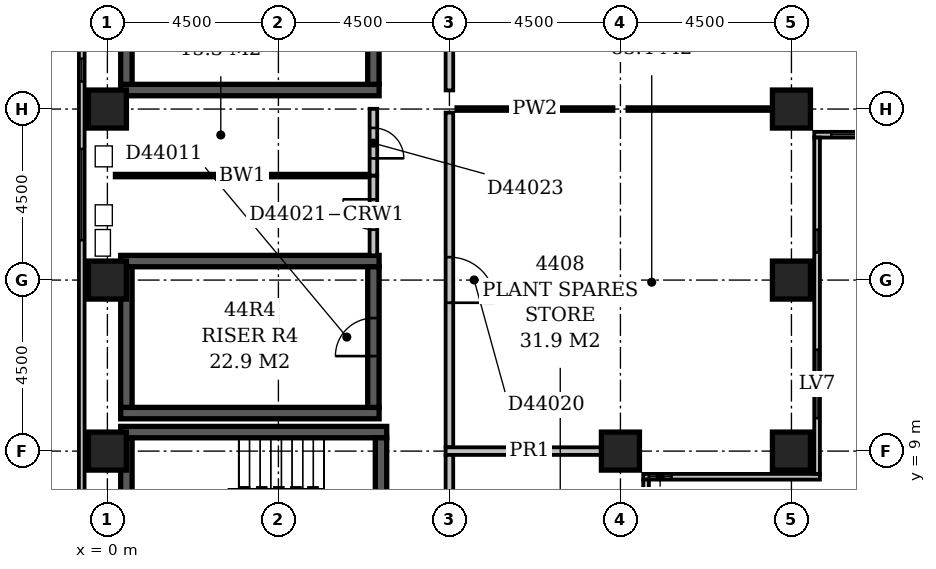
"""IFC4 building model, lengths in metres.
Left out: names, types, materials, properties, quantities, classifications, styles, units other than length and angle.
Written with IfcOpenShell. Run it as: python <this file> out.ifc"""

import sys

from ifc_helpers import new_model, si_unit, direction, frame, frame_2d, origin, origin_2d, place, context, subcontext, project, spatial, rectangle, extrude, element, fill, save


model = new_model("IFC4")
c1 = context("Model", 3, precision=1e-05, world=origin(), true_north=direction((0.0, 1.0)))
c2 = subcontext(c1, "Body", "Model", "MODEL_VIEW")
j1 = project(units=[si_unit("LENGTHUNIT", "METRE"), si_unit("PLANEANGLEUNIT", "RADIAN")], contexts=[c1])
p1 = place(None, origin())
s1 = spatial("IfcSite", under=j1, at=p1, CompositionType="ELEMENT")
p2 = place(p1, origin())
s2 = spatial("IfcBuilding", under=s1, at=p2, CompositionType="ELEMENT")
p3 = place(p2, frame((0.0, 0.0, 173.6)))
s3 = spatial("IfcBuildingStorey", under=s2, at=p3, CompositionType="ELEMENT", Elevation=173.6)
p4 = place(p3, frame((0.35, 9.5, -0.45), z_axis=(0.0, 0.0, 1.0), x_axis=(1.0, 0.0, 0.0)))
e1 = element("IfcWall", 1, at=p4, inside=s3, PredefinedType="SHEAR", context=c2, shape_type="SweptSolid", body=[
    extrude(rectangle(XDim=7.0, YDim=0.3, at=frame_2d((3.5, 0.0))), origin(), (0.0, 0.0, 1.0), 5.55),
])
for number, where, z_axis, x_axis in (
    (2, (0.35, 10.0, -0.45), (0.0, 0.0, 1.0), (1.0, 0.0, 0.0)),
    (3, (0.35, 14.0, -0.45), (0.0, 0.0, 1.0), (1.0, 0.0, 0.0)),
    (4, (0.35, 18.5, -0.45), (0.0, 0.0, 1.0), (1.0, 0.0, 0.0)),
):
    element("IfcWall", number, at=place(p3, frame(where, z_axis=z_axis, x_axis=x_axis)), inside=s3, PredefinedType="SHEAR", context=c2, shape_type="SweptSolid", body=[
        extrude(rectangle(XDim=6.8, YDim=0.3, at=frame_2d((3.4, 0.0))), origin(), (0.0, 0.0, 1.0), 5.55),
    ])
p5 = place(p3, frame((0.5, 5.15, -0.45), z_axis=(0.0, 0.0, 1.0), x_axis=(0.0, 1.0, 0.0)))
e5 = element("IfcWall", 5, at=p5, inside=s3, PredefinedType="SHEAR", context=c2, shape_type="SweptSolid", body=[
    extrude(rectangle(XDim=4.2, YDim=0.3, at=frame_2d((2.1, 0.0))), origin(), (0.0, 0.0, 1.0), 5.55),
])
for number, where, z_axis, x_axis in (
    (6, (0.5, 10.15, -0.45), (0.0, 0.0, 1.0), (0.0, 1.0, 0.0)),
    (7, (0.5, 18.65, -0.45), (0.0, 0.0, 1.0), (0.0, 1.0, 0.0)),
):
    element("IfcWall", number, at=place(p3, frame(where, z_axis=z_axis, x_axis=x_axis)), inside=s3, PredefinedType="SHEAR", context=c2, shape_type="SweptSolid", body=[
        extrude(rectangle(XDim=3.7, YDim=0.3, at=frame_2d((1.85, 0.0))), origin(), (0.0, 0.0, 1.0), 5.55),
    ])
p6 = place(p3, frame((7.0, 10.15, -0.45), z_axis=(0.0, 0.0, 1.0), x_axis=(0.0, 1.0, 0.0)))
e8 = element("IfcWall", 8, at=p6, inside=s3, PredefinedType="SHEAR", context=c2, shape_type="SweptSolid", body=[
    extrude(rectangle(XDim=3.7, YDim=0.3, at=frame_2d((1.85, 0.0))), origin(), (0.0, 0.0, 1.0), 5.55),
])
p7 = place(p6, frame((1.35, 0.0, 0.45)))
e9 = element("IfcOpeningElement", 9, at=p7, cuts=e8, PredefinedType="OPENING", context=c2, shape_type="SweptSolid", body=[
    extrude(rectangle(XDim=1.0, YDim=2.1, at=frame_2d((0.5, 1.05))), frame((0.0, 0.162, 0.0), z_axis=(0.0, -1.0, 0.0), x_axis=(1.0, 0.0, 0.0)), (0.0, 0.0, 1.0), 0.324),
])
p8 = place(p3, frame((7.0, 18.65, -0.45), z_axis=(0.0, 0.0, 1.0), x_axis=(0.0, 1.0, 0.0)))
e10 = element("IfcWall", 10, at=p8, inside=s3, PredefinedType="SHEAR", context=c2, shape_type="SweptSolid", body=[
    extrude(rectangle(XDim=3.7, YDim=0.3, at=frame_2d((1.85, 0.0))), origin(), (0.0, 0.0, 1.0), 5.55),
])
p9 = place(p8, frame((1.35, 0.0, 0.45)))
e11 = element("IfcOpeningElement", 11, at=p9, cuts=e10, PredefinedType="OPENING", context=c2, shape_type="SweptSolid", body=[
    extrude(rectangle(XDim=1.0, YDim=2.1, at=frame_2d((0.5, 1.05))), frame((0.0, 0.162, 0.0), z_axis=(0.0, -1.0, 0.0), x_axis=(1.0, 0.0, 0.0)), (0.0, 0.0, 1.0), 0.324),
])
p10 = place(p3, frame((7.2, 5.15, -0.45), z_axis=(0.0, 0.0, 1.0), x_axis=(0.0, 1.0, 0.0)))
e12 = element("IfcWall", 12, at=p10, inside=s3, PredefinedType="SHEAR", context=c2, shape_type="SweptSolid", body=[
    extrude(rectangle(XDim=4.2, YDim=0.3, at=frame_2d((2.1, 0.0))), origin(), (0.0, 0.0, 1.0), 5.55),
])
p11 = place(p10, frame((1.55, 0.0, 0.45)))
e13 = element("IfcOpeningElement", 13, at=p11, cuts=e12, PredefinedType="OPENING", context=c2, shape_type="SweptSolid", body=[
    extrude(rectangle(XDim=1.1, YDim=2.1, at=frame_2d((0.55, 1.05))), frame((0.0, 0.162, 0.0), z_axis=(0.0, -1.0, 0.0), x_axis=(1.0, 0.0, 0.0)), (0.0, 0.0, 1.0), 0.324),
])
for number, where, z_axis, x_axis in (
    (14, (0.0, 9.0, -0.45), (0.0, 0.0, 1.0), (1.0, 0.0, 0.0)),
    (15, (13.5, 9.0, -0.45), (0.0, 0.0, 1.0), (1.0, 0.0, 0.0)),
    (16, (18.0, 9.0, -0.45), (0.0, 0.0, 1.0), (1.0, 0.0, 0.0)),
    (17, (0.0, 13.5, -0.45), (0.0, 0.0, 1.0), (1.0, 0.0, 0.0)),
    (18, (18.0, 13.5, -0.45), (0.0, 0.0, 1.0), (1.0, 0.0, 0.0)),
    (19, (0.0, 18.0, -0.45), (0.0, 0.0, 1.0), (1.0, 0.0, 0.0)),
    (20, (18.0, 18.0, -0.45), (0.0, 0.0, 1.0), (1.0, 0.0, 0.0)),
):
    element("IfcColumn", number, at=place(p3, frame(where, z_axis=z_axis, x_axis=x_axis)), inside=s3, PredefinedType="COLUMN", context=c2, shape_type="SweptSolid", body=[
        extrude(rectangle(XDim=1.0, YDim=1.0, at=origin_2d()), origin(), (0.0, 0.0, 1.0), 5.55),
    ])
p12 = place(p3, frame((14.175, 3.9, 0.0), z_axis=(0.0, 0.0, 1.0), x_axis=(0.0, 1.0, 0.0)))
e21 = element("IfcWall", 21, at=p12, inside=s3, PredefinedType="STANDARD", context=c2, shape_type="SweptSolid", body=[
    extrude(rectangle(XDim=4.35, YDim=0.15, at=frame_2d((2.175, 0.0))), origin(), (0.0, 0.0, 1.0), 4.5),
])
p13 = place(p12, frame((1.65, 0.0, 0.6)))
e22 = element("IfcOpeningElement", 22, at=p13, cuts=e21, PredefinedType="OPENING", context=c2, shape_type="SweptSolid", body=[
    extrude(rectangle(XDim=2.4, YDim=2.4, at=frame_2d((1.2, 1.2))), frame((0.0, 0.087, 0.0), z_axis=(0.0, -1.0, 0.0), x_axis=(1.0, 0.0, 0.0)), (0.0, 0.0, 1.0), 0.174),
])
p14 = place(p3, frame((14.1, 8.325, 0.0), z_axis=(0.0, 0.0, 1.0), x_axis=(1.0, 0.0, 0.0)))
e23 = element("IfcWall", 23, at=p14, inside=s3, PredefinedType="STANDARD", context=c2, shape_type="SweptSolid", body=[
    extrude(rectangle(XDim=4.65, YDim=0.15, at=frame_2d((2.325, 0.0))), origin(), (0.0, 0.0, 1.0), 4.5),
])
p15 = place(p14, frame((0.145, 0.0, 0.6)))
e24 = element("IfcOpeningElement", 24, at=p15, cuts=e23, PredefinedType="OPENING", context=c2, shape_type="SweptSolid", body=[
    extrude(rectangle(XDim=0.6, YDim=2.4, at=frame_2d((0.3, 1.2))), frame((0.0, 0.087, 0.0), z_axis=(0.0, -1.0, 0.0), x_axis=(1.0, 0.0, 0.0)), (0.0, 0.0, 1.0), 0.174),
])
p16 = place(p3, frame((18.675, 8.4, 0.0), z_axis=(0.0, 0.0, 1.0), x_axis=(0.0, 1.0, 0.0)))
e25 = element("IfcWall", 25, at=p16, inside=s3, PredefinedType="STANDARD", context=c2, shape_type="SweptSolid", body=[
    extrude(rectangle(XDim=8.85, YDim=0.15, at=frame_2d((4.425, 0.0))), origin(), (0.0, 0.0, 1.0), 4.5),
])
p17 = place(p16, frame((1.467, 0.0, 0.6)))
e26 = element("IfcOpeningElement", 26, at=p17, cuts=e25, PredefinedType="OPENING", context=c2, shape_type="SweptSolid", body=[
    extrude(rectangle(XDim=1.8, YDim=2.4, at=frame_2d((0.9, 1.2))), frame((0.0, 0.087, 0.0), z_axis=(0.0, -1.0, 0.0), x_axis=(1.0, 0.0, 0.0)), (0.0, 0.0, 1.0), 0.174),
])
p18 = place(p16, frame((5.825, 0.0, 0.6)))
e27 = element("IfcOpeningElement", 27, at=p18, cuts=e25, PredefinedType="OPENING", context=c2, shape_type="SweptSolid", body=[
    extrude(rectangle(XDim=0.6, YDim=2.4, at=frame_2d((0.3, 1.2))), frame((0.0, 0.087, 0.0), z_axis=(0.0, -1.0, 0.0), x_axis=(1.0, 0.0, 0.0)), (0.0, 0.0, 1.0), 0.174),
])
p19 = place(p3, frame((18.6, 17.325, 0.0), z_axis=(0.0, 0.0, 1.0), x_axis=(1.0, 0.0, 0.0)))
e28 = element("IfcWall", 28, at=p19, inside=s3, PredefinedType="STANDARD", context=c2, shape_type="SweptSolid", body=[
    extrude(rectangle(XDim=4.65, YDim=0.15, at=frame_2d((2.325, 0.0))), origin(), (0.0, 0.0, 1.0), 4.5),
])
p20 = place(p19, frame((0.45, 0.0, 0.6)))
e29 = element("IfcOpeningElement", 29, at=p20, cuts=e28, PredefinedType="OPENING", context=c2, shape_type="SweptSolid", body=[
    extrude(rectangle(XDim=2.4, YDim=2.4, at=frame_2d((1.2, 1.2))), frame((0.0, 0.087, 0.0), z_axis=(0.0, -1.0, 0.0), x_axis=(1.0, 0.0, 0.0)), (0.0, 0.0, 1.0), 0.174),
])
p21 = place(p3, frame((-0.675, 59.1, 0.0), z_axis=(0.0, 0.0, 1.0), x_axis=(0.0, -1.0, 0.0)))
e30 = element("IfcWall", 30, at=p21, inside=s3, PredefinedType="STANDARD", context=c2, shape_type="SweptSolid", body=[
    extrude(rectangle(XDim=55.35, YDim=0.15, at=frame_2d((27.675, 0.0))), origin(), (0.0, 0.0, 1.0), 4.5),
])
p22 = place(p21, frame((3.775, 0.0, 0.6)))
e31 = element("IfcOpeningElement", 31, at=p22, cuts=e30, PredefinedType="OPENING", context=c2, shape_type="SweptSolid", body=[
    extrude(rectangle(XDim=0.6, YDim=2.4, at=frame_2d((0.3, 1.2))), frame((0.0, 0.087, 0.0), z_axis=(0.0, -1.0, 0.0), x_axis=(1.0, 0.0, 0.0)), (0.0, 0.0, 1.0), 0.174),
])
p23 = place(p21, frame((7.588, 0.0, 0.6)))
e32 = element("IfcOpeningElement", 32, at=p23, cuts=e30, PredefinedType="OPENING", context=c2, shape_type="SweptSolid", body=[
    extrude(rectangle(XDim=1.2, YDim=2.4, at=frame_2d((0.6, 1.2))), frame((0.0, 0.087, 0.0), z_axis=(0.0, -1.0, 0.0), x_axis=(1.0, 0.0, 0.0)), (0.0, 0.0, 1.0), 0.174),
])
p24 = place(p21, frame((12.775, 0.0, 0.6)))
e33 = element("IfcOpeningElement", 33, at=p24, cuts=e30, PredefinedType="OPENING", context=c2, shape_type="SweptSolid", body=[
    extrude(rectangle(XDim=0.6, YDim=2.4, at=frame_2d((0.3, 1.2))), frame((0.0, 0.087, 0.0), z_axis=(0.0, -1.0, 0.0), x_axis=(1.0, 0.0, 0.0)), (0.0, 0.0, 1.0), 0.174),
])
p25 = place(p21, frame((15.15, 0.0, 0.6)))
e34 = element("IfcOpeningElement", 34, at=p25, cuts=e30, PredefinedType="OPENING", context=c2, shape_type="SweptSolid", body=[
    extrude(rectangle(XDim=2.4, YDim=2.4, at=frame_2d((1.2, 1.2))), frame((0.0, 0.087, 0.0), z_axis=(0.0, -1.0, 0.0), x_axis=(1.0, 0.0, 0.0)), (0.0, 0.0, 1.0), 0.174),
])
p26 = place(p21, frame((24.15, 0.0, 0.6)))
e35 = element("IfcOpeningElement", 35, at=p26, cuts=e30, PredefinedType="OPENING", context=c2, shape_type="SweptSolid", body=[
    extrude(rectangle(XDim=2.4, YDim=2.4, at=frame_2d((1.2, 1.2))), frame((0.0, 0.087, 0.0), z_axis=(0.0, -1.0, 0.0), x_axis=(1.0, 0.0, 0.0)), (0.0, 0.0, 1.0), 0.174),
])
p27 = place(p21, frame((30.775, 0.0, 0.6)))
e36 = element("IfcOpeningElement", 36, at=p27, cuts=e30, PredefinedType="OPENING", context=c2, shape_type="SweptSolid", body=[
    extrude(rectangle(XDim=0.6, YDim=2.4, at=frame_2d((0.3, 1.2))), frame((0.0, 0.087, 0.0), z_axis=(0.0, -1.0, 0.0), x_axis=(1.0, 0.0, 0.0)), (0.0, 0.0, 1.0), 0.174),
])
p28 = place(p21, frame((34.588, 0.0, 0.6)))
e37 = element("IfcOpeningElement", 37, at=p28, cuts=e30, PredefinedType="OPENING", context=c2, shape_type="SweptSolid", body=[
    extrude(rectangle(XDim=1.2, YDim=2.4, at=frame_2d((0.6, 1.2))), frame((0.0, 0.087, 0.0), z_axis=(0.0, -1.0, 0.0), x_axis=(1.0, 0.0, 0.0)), (0.0, 0.0, 1.0), 0.174),
])
p29 = place(p21, frame((39.775, 0.0, 0.6)))
e38 = element("IfcOpeningElement", 38, at=p29, cuts=e30, PredefinedType="OPENING", context=c2, shape_type="SweptSolid", body=[
    extrude(rectangle(XDim=0.6, YDim=2.4, at=frame_2d((0.3, 1.2))), frame((0.0, 0.087, 0.0), z_axis=(0.0, -1.0, 0.0), x_axis=(1.0, 0.0, 0.0)), (0.0, 0.0, 1.0), 0.174),
])
p30 = place(p21, frame((42.15, 0.0, 0.6)))
e39 = element("IfcOpeningElement", 39, at=p30, cuts=e30, PredefinedType="OPENING", context=c2, shape_type="SweptSolid", body=[
    extrude(rectangle(XDim=2.4, YDim=2.4, at=frame_2d((1.2, 1.2))), frame((0.0, 0.087, 0.0), z_axis=(0.0, -1.0, 0.0), x_axis=(1.0, 0.0, 0.0)), (0.0, 0.0, 1.0), 0.174),
])
p31 = place(p21, frame((51.15, 0.0, 0.6)))
e40 = element("IfcOpeningElement", 40, at=p31, cuts=e30, PredefinedType="OPENING", context=c2, shape_type="SweptSolid", body=[
    extrude(rectangle(XDim=2.4, YDim=2.4, at=frame_2d((1.2, 1.2))), frame((0.0, 0.087, 0.0), z_axis=(0.0, -1.0, 0.0), x_axis=(1.0, 0.0, 0.0)), (0.0, 0.0, 1.0), 0.174),
])
p32 = place(p3, frame((9.0, 5.1, 0.0), z_axis=(0.0, 0.0, 1.0), x_axis=(0.0, 1.0, 0.0)))
e41 = element("IfcWall", 41, at=p32, inside=s3, PredefinedType="PARTITIONING", context=c2, shape_type="SweptSolid", body=[
    extrude(rectangle(XDim=3.8, YDim=0.2, at=frame_2d((1.9, 0.0))), origin(), (0.0, 0.0, 1.0), 5.1),
])
p33 = place(p32, frame((1.4, 0.0, 0.0)))
e42 = element("IfcOpeningElement", 42, at=p33, cuts=e41, PredefinedType="OPENING", context=c2, shape_type="SweptSolid", body=[
    extrude(rectangle(XDim=1.0, YDim=2.1, at=frame_2d((0.5, 1.05))), frame((0.0, 0.112, 0.0), z_axis=(0.0, -1.0, 0.0), x_axis=(1.0, 0.0, 0.0)), (0.0, 0.0, 1.0), 0.224),
])
p34 = place(p3, frame((9.0, 9.1, 0.0), z_axis=(0.0, 0.0, 1.0), x_axis=(0.0, 1.0, 0.0)))
e43 = element("IfcWall", 43, at=p34, inside=s3, PredefinedType="PARTITIONING", context=c2, shape_type="SweptSolid", body=[
    extrude(rectangle(XDim=8.806, YDim=0.2, at=frame_2d((4.403, 0.0))), origin(), (0.0, 0.0, 1.0), 5.1),
])
p35 = place(p34, frame((3.803, 0.0, 0.0)))
e44 = element("IfcOpeningElement", 44, at=p35, cuts=e43, PredefinedType="OPENING", context=c2, shape_type="SweptSolid", body=[
    extrude(rectangle(XDim=1.2, YDim=2.1, at=frame_2d((0.6, 1.05))), frame((0.0, 0.112, 0.0), z_axis=(0.0, -1.0, 0.0), x_axis=(1.0, 0.0, 0.0)), (0.0, 0.0, 1.0), 0.224),
])
p36 = place(p3, frame((13.309, 9.0, 0.0), z_axis=(0.0, 0.0, 1.0), x_axis=(-1.0, 0.0, 0.0)))
e45 = element("IfcWall", 45, at=p36, inside=s3, PredefinedType="PARTITIONING", context=c2, shape_type="SweptSolid", body=[
    extrude(rectangle(XDim=4.409, YDim=0.2, at=frame_2d((2.204, 0.0))), origin(), (0.0, 0.0, 1.0), 5.1),
])
p37 = place(p3, frame((0.191, 16.25, 0.0), z_axis=(0.0, 0.0, 1.0), x_axis=(1.0, 0.0, 0.0)))
e46 = element("IfcWall", 46, at=p37, inside=s3, PredefinedType="PLUMBINGWALL", context=c2, shape_type="SweptSolid", body=[
    extrude(rectangle(XDim=6.708, YDim=0.1, at=frame_2d((3.354, 0.0))), origin(), (0.0, 0.0, 1.0), 5.1),
])
p38 = place(p3, frame((7.0, 16.25, 0.0), z_axis=(0.0, 0.0, 1.0), x_axis=(0.0, -1.0, 0.0)))
e47 = element("IfcWall", 47, at=p38, inside=s3, PredefinedType="PARTITIONING", context=c2, shape_type="SweptSolid", body=[
    extrude(rectangle(XDim=2.1, YDim=0.2, at=frame_2d((1.05, 0.0))), origin(), (0.0, 0.0, 1.0), 5.1),
])
p39 = place(p38, frame((0.625, 0.0, 0.0)))
e48 = element("IfcOpeningElement", 48, at=p39, cuts=e47, PredefinedType="OPENING", context=c2, shape_type="SweptSolid", body=[
    extrude(rectangle(XDim=0.8, YDim=2.1, at=frame_2d((0.4, 1.05))), frame((0.0, 0.112, 0.0), z_axis=(0.0, -1.0, 0.0), x_axis=(1.0, 0.0, 0.0)), (0.0, 0.0, 1.0), 0.224),
])
p40 = place(p3, frame((9.0, 18.49, 0.0), z_axis=(0.0, 0.0, 1.0), x_axis=(0.0, 1.0, 0.0)))
e49 = element("IfcWall", 49, at=p40, inside=s3, PredefinedType="PARTITIONING", context=c2, shape_type="SweptSolid", body=[
    extrude(rectangle(XDim=17.409, YDim=0.2, at=frame_2d((8.705, 0.0))), origin(), (0.0, 0.0, 1.0), 5.1),
])
p41 = place(p40, frame((9.155, 0.0, 0.0)))
e50 = element("IfcOpeningElement", 50, at=p41, cuts=e49, PredefinedType="OPENING", context=c2, shape_type="SweptSolid", body=[
    extrude(rectangle(XDim=1.2, YDim=2.1, at=frame_2d((0.6, 1.05))), frame((0.0, 0.112, 0.0), z_axis=(0.0, -1.0, 0.0), x_axis=(1.0, 0.0, 0.0)), (0.0, 0.0, 1.0), 0.224),
])
p42 = place(p3, frame((17.809, 18.0, 0.0), z_axis=(0.0, 0.0, 1.0), x_axis=(-1.0, 0.0, 0.0)))
e51 = element("IfcWall", 51, at=p42, inside=s3, PredefinedType="PARTITIONING", context=c2, shape_type="SweptSolid", body=[
    extrude(rectangle(XDim=4.125, YDim=0.1, at=frame_2d((2.063, 0.0))), origin(), (0.0, 0.0, 1.0), 5.1),
])
p43 = place(p3, frame((13.317, 18.0, 0.0), z_axis=(0.0, 0.0, 1.0), x_axis=(-1.0, 0.0, 0.0)))
e52 = element("IfcWall", 52, at=p43, inside=s3, PredefinedType="PARTITIONING", context=c2, shape_type="SweptSolid", body=[
    extrude(rectangle(XDim=4.134, YDim=0.1, at=frame_2d((2.067, 0.0))), origin(), (0.0, 0.0, 1.0), 5.1),
])
p44 = place(p3, frame((7.0, 18.006, 0.0), z_axis=(0.0, 0.0, 1.0), x_axis=(0.0, -1.0, 0.0)))
e53 = element("IfcWall", 53, at=p44, inside=s3, PredefinedType="PARTITIONING", context=c2, shape_type="SweptSolid", body=[
    extrude(rectangle(XDim=1.756, YDim=0.2, at=frame_2d((0.878, 0.0))), origin(), (0.0, 0.0, 1.0), 5.1),
])
p45 = place(p44, frame((0.503, 0.0, 0.0)))
e54 = element("IfcOpeningElement", 54, at=p45, cuts=e53, PredefinedType="OPENING", context=c2, shape_type="SweptSolid", body=[
    extrude(rectangle(XDim=0.8, YDim=2.1, at=frame_2d((0.4, 1.05))), frame((0.0, 0.112, 0.0), z_axis=(0.0, -1.0, 0.0), x_axis=(1.0, 0.0, 0.0)), (0.0, 0.0, 1.0), 0.224),
])
p46 = place(p15, origin())
e55 = element("IfcWindow", 55, at=p46, inside=s3, PartitioningType="SINGLE_PANEL", PredefinedType="USERDEFINED", context=c2, shape_type="SweptSolid", body=[
    extrude(rectangle(XDim=0.6, YDim=2.4, at=frame_2d((0.3, 1.2))), frame((0.0, 0.03, 0.0), z_axis=(0.0, -1.0, 0.0), x_axis=(1.0, 0.0, 0.0)), (0.0, 0.0, 1.0), 0.06),
])
fill(e24, e55)
p47 = place(p17, origin())
e56 = element("IfcWindow", 56, at=p47, inside=s3, PartitioningType="SINGLE_PANEL", PredefinedType="USERDEFINED", context=c2, shape_type="SweptSolid", body=[
    extrude(rectangle(XDim=1.8, YDim=2.4, at=frame_2d((0.9, 1.2))), frame((0.0, 0.03, 0.0), z_axis=(0.0, -1.0, 0.0), x_axis=(1.0, 0.0, 0.0)), (0.0, 0.0, 1.0), 0.06),
])
fill(e26, e56)
p48 = place(p18, origin())
e57 = element("IfcWindow", 57, at=p48, inside=s3, PartitioningType="SINGLE_PANEL", PredefinedType="USERDEFINED", context=c2, shape_type="SweptSolid", body=[
    extrude(rectangle(XDim=0.6, YDim=2.4, at=frame_2d((0.3, 1.2))), frame((0.0, 0.03, 0.0), z_axis=(0.0, -1.0, 0.0), x_axis=(1.0, 0.0, 0.0)), (0.0, 0.0, 1.0), 0.06),
])
fill(e27, e57)
p49 = place(p20, origin())
e58 = element("IfcWindow", 58, at=p49, inside=s3, PartitioningType="SINGLE_PANEL", PredefinedType="USERDEFINED", context=c2, shape_type="SweptSolid", body=[
    extrude(rectangle(XDim=2.4, YDim=2.4, at=frame_2d((1.2, 1.2))), frame((0.0, 0.03, 0.0), z_axis=(0.0, -1.0, 0.0), x_axis=(1.0, 0.0, 0.0)), (0.0, 0.0, 1.0), 0.06),
])
fill(e29, e58)
p50 = place(p29, origin())
e59 = element("IfcWindow", 59, at=p50, inside=s3, PartitioningType="SINGLE_PANEL", PredefinedType="USERDEFINED", context=c2, shape_type="SweptSolid", body=[
    extrude(rectangle(XDim=0.6, YDim=2.4, at=frame_2d((0.3, 1.2))), frame((0.0, 0.03, 0.0), z_axis=(0.0, -1.0, 0.0), x_axis=(1.0, 0.0, 0.0)), (0.0, 0.0, 1.0), 0.06),
])
fill(e38, e59)
p51 = place(p30, origin())
e60 = element("IfcWindow", 60, at=p51, inside=s3, PartitioningType="SINGLE_PANEL", PredefinedType="USERDEFINED", context=c2, shape_type="SweptSolid", body=[
    extrude(rectangle(XDim=2.4, YDim=2.4, at=frame_2d((1.2, 1.2))), frame((0.0, 0.03, 0.0), z_axis=(0.0, -1.0, 0.0), x_axis=(1.0, 0.0, 0.0)), (0.0, 0.0, 1.0), 0.06),
])
fill(e39, e60)
p52 = place(p7, origin())
e61 = element("IfcDoor", 61, at=p52, inside=s3, OperationType="SINGLE_SWING_LEFT", PredefinedType="DOOR", context=c2, shape_type="SweptSolid", body=[
    extrude(rectangle(XDim=1.0, YDim=2.1, at=frame_2d((0.5, 1.05))), frame((0.0, 0.025, 0.0), z_axis=(0.0, -1.0, 0.0), x_axis=(1.0, 0.0, 0.0)), (0.0, 0.0, 1.0), 0.05),
])
fill(e9, e61)
p53 = place(p35, frame((1.2, 0.0, 0.0), z_axis=(0.0, 0.0, 1.0), x_axis=(-1.0, 0.0, 0.0)))
e62 = element("IfcDoor", 62, at=p53, inside=s3, OperationType="SINGLE_SWING_RIGHT", PredefinedType="DOOR", context=c2, shape_type="SweptSolid", body=[
    extrude(rectangle(XDim=1.2, YDim=2.1, at=frame_2d((0.6, 1.05))), frame((0.0, 0.025, 0.0), z_axis=(0.0, -1.0, 0.0), x_axis=(1.0, 0.0, 0.0)), (0.0, 0.0, 1.0), 0.05),
])
fill(e44, e62)
p54 = place(p39, frame((0.8, 0.0, 0.0), z_axis=(0.0, 0.0, 1.0), x_axis=(-1.0, 0.0, 0.0)))
e63 = element("IfcDoor", 63, at=p54, inside=s3, OperationType="SINGLE_SWING_RIGHT", PredefinedType="DOOR", context=c2, shape_type="SweptSolid", body=[
    extrude(rectangle(XDim=0.8, YDim=2.1, at=frame_2d((0.4, 1.05))), frame((0.0, 0.025, 0.0), z_axis=(0.0, -1.0, 0.0), x_axis=(1.0, 0.0, 0.0)), (0.0, 0.0, 1.0), 0.05),
])
fill(e48, e63)
p55 = place(p45, frame((0.8, 0.0, 0.0), z_axis=(0.0, 0.0, 1.0), x_axis=(-1.0, 0.0, 0.0)))
e64 = element("IfcDoor", 64, at=p55, inside=s3, OperationType="SINGLE_SWING_LEFT", PredefinedType="DOOR", context=c2, shape_type="SweptSolid", body=[
    extrude(rectangle(XDim=0.8, YDim=2.1, at=frame_2d((0.4, 1.05))), frame((0.0, 0.025, 0.0), z_axis=(0.0, -1.0, 0.0), x_axis=(1.0, 0.0, 0.0)), (0.0, 0.0, 1.0), 0.05),
])
fill(e54, e64)
save(model, sys.argv[1])
